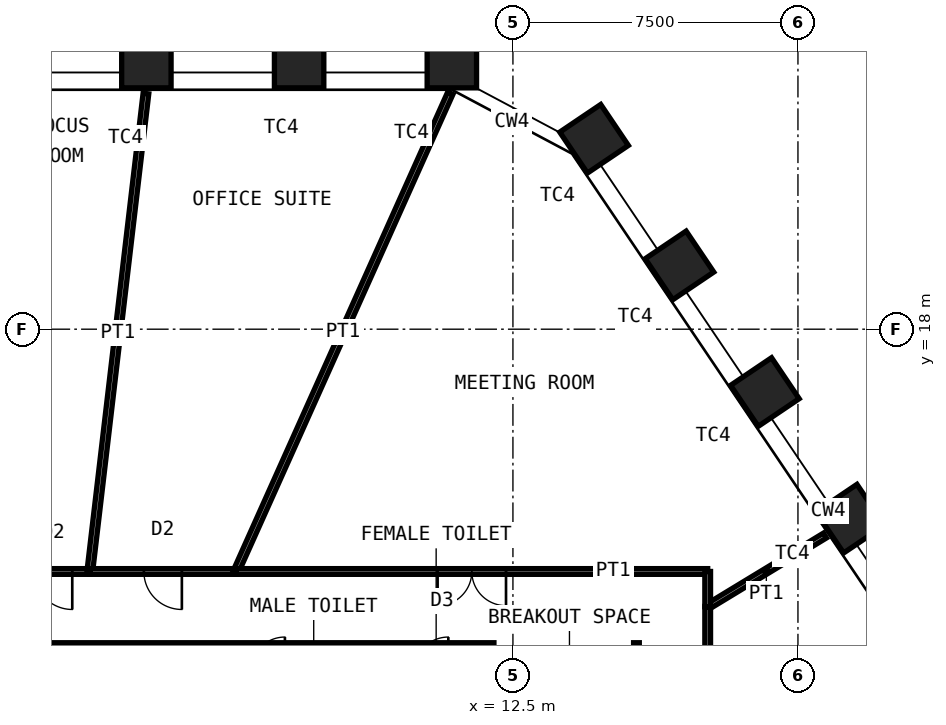
"""IFC4 building model, lengths in metres.
Left out: names, types, materials, properties, quantities, classifications, styles, units other than length and angle.
Written with IfcOpenShell. Run it as: python <this file> out.ifc"""

import sys

from ifc_helpers import new_model, si_unit, direction, frame, frame_2d, origin, origin_2d, place, context, subcontext, project, spatial, rectangle, hollow_rectangle, extrude, element, fill, save


model = new_model("IFC4")
c1 = context("Model", 3, precision=1e-05, world=origin(), true_north=direction((0.0, 1.0)))
c2 = subcontext(c1, "Body", "Model", "MODEL_VIEW")
j1 = project(units=[si_unit("LENGTHUNIT", "METRE"), si_unit("PLANEANGLEUNIT", "RADIAN")], contexts=[c1])
p1 = place(None, origin())
s1 = spatial("IfcSite", under=j1, at=p1, CompositionType="ELEMENT")
p2 = place(p1, origin())
s2 = spatial("IfcBuilding", under=s1, at=p2, CompositionType="ELEMENT")
p3 = place(p2, frame((0.0, 0.0, 145.0)))
s3 = spatial("IfcBuildingStorey", under=s2, at=p3, CompositionType="ELEMENT", Elevation=145.0)
for number, where, z_axis, x_axis in (
    (1, (2.854, 25.0, 0.0), (0.0, 0.0, 1.0), (-1.0, 0.0, 0.0)),
    (2, (6.874, 25.0, 0.0), (0.0, 0.0, 1.0), (-1.0, 0.0, 0.0)),
    (3, (10.893, 25.0, 0.0), (0.0, 0.0, 1.0), (-1.0, 0.0, 0.0)),
    (4, (14.635, 23.01, 0.0), (0.0, 0.0, 1.0), (-0.559, 0.829, 0.0)),
    (5, (16.882, 19.678, 0.0), (0.0, 0.0, 1.0), (-0.559, 0.829, 0.0)),
    (6, (19.13, 16.346, 0.0), (0.0, 0.0, 1.0), (-0.559, 0.829, 0.0)),
    (7, (21.377, 13.014, 0.0), (0.0, 0.0, 1.0), (-0.559, 0.829, 0.0)),
):
    element("IfcColumn", number, at=place(p3, frame(where, z_axis=z_axis, x_axis=x_axis)), inside=s3, PredefinedType="COLUMN", context=c2, shape_type="SweptSolid", body=[
        extrude(hollow_rectangle(XDim=1.3, YDim=1.3, WallThickness=0.1, at=origin_2d()), origin(), (0.0, 0.0, 1.0), 4.2),
    ])
p4 = place(p3, frame((-12.0, 9.0, 0.0), z_axis=(0.0, 0.0, 1.0), x_axis=(1.0, 0.0, 0.0)))
e8 = element("IfcWall", 8, at=p4, inside=s3, PredefinedType="SHEAR", context=c2, shape_type="SweptSolid", body=[
    extrude(rectangle(XDim=24.0, YDim=1.5, at=frame_2d((12.0, 0.0))), origin(), (0.0, 0.0, 1.0), 4.2),
])
p5 = place(p4, frame((10.4, 0.0, 0.0)))
e9 = element("IfcOpeningElement", 9, at=p5, cuts=e8, PredefinedType="OPENING", context=c2, shape_type="SweptSolid", body=[
    extrude(rectangle(XDim=1.0, YDim=2.1, at=frame_2d((0.5, 1.05))), frame((0.0, 0.76, 0.0), z_axis=(0.0, -1.0, 0.0), x_axis=(1.0, 0.0, 0.0)), (0.0, 0.0, 1.0), 1.52),
])
p6 = place(p4, frame((17.6, 0.0, 0.0)))
e10 = element("IfcOpeningElement", 10, at=p6, cuts=e8, PredefinedType="OPENING", context=c2, shape_type="SweptSolid", body=[
    extrude(rectangle(XDim=0.9, YDim=2.1, at=frame_2d((0.45, 1.05))), frame((0.0, 0.76, 0.0), z_axis=(0.0, -1.0, 0.0), x_axis=(1.0, 0.0, 0.0)), (0.0, 0.0, 1.0), 1.52),
])
p7 = place(p4, frame((21.9, 0.0, 0.0)))
e11 = element("IfcOpeningElement", 11, at=p7, cuts=e8, PredefinedType="OPENING", context=c2, shape_type="SweptSolid", body=[
    extrude(rectangle(XDim=0.9, YDim=2.1, at=frame_2d((0.45, 1.05))), frame((0.0, 0.76, 0.0), z_axis=(0.0, -1.0, 0.0), x_axis=(1.0, 0.0, 0.0)), (0.0, 0.0, 1.0), 1.52),
])
p8 = place(p3, frame((20.711, 12.571, 0.0), z_axis=(0.0, 0.0, 1.0), x_axis=(-0.854862500505, -0.518854608952, 0.0)))
e12 = element("IfcWall", 12, at=p8, inside=s3, PredefinedType="PARTITIONING", context=c2, shape_type="SweptSolid", body=[
    extrude(rectangle(XDim=3.61, YDim=0.15, at=frame_2d((1.805, 0.0))), origin(), (0.0, 0.0, 1.0), 3.33),
])
p9 = place(p3, frame((17.625, 10.698, 0.0), z_axis=(0.0, 0.0, 1.0), x_axis=(0.0, -1.0, 0.0)))
e13 = element("IfcWall", 13, at=p9, inside=s3, PredefinedType="PARTITIONING", context=c2, shape_type="SweptSolid", body=[
    extrude(rectangle(XDim=19.778, YDim=0.15, at=frame_2d((9.889, 0.0))), origin(), (0.0, 0.0, 1.0), 4.03),
])
p10 = place(p9, frame((8.989, 0.0, 0.0)))
e14 = element("IfcOpeningElement", 14, at=p10, cuts=e13, PredefinedType="OPENING", context=c2, shape_type="SweptSolid", body=[
    extrude(rectangle(XDim=1.8, YDim=2.4, at=frame_2d((0.9, 1.2))), frame((0.0, 0.085, 0.0), z_axis=(0.0, -1.0, 0.0), x_axis=(1.0, 0.0, 0.0)), (0.0, 0.0, 1.0), 0.17),
])
p11 = place(p3, frame((-0.557, 11.625, 0.0), z_axis=(0.0, 0.0, 1.0), x_axis=(1.0, 0.0, 0.0)))
e15 = element("IfcWall", 15, at=p11, inside=s3, PredefinedType="PARTITIONING", context=c2, shape_type="SweptSolid", body=[
    extrude(rectangle(XDim=1.923, YDim=0.15, at=frame_2d((0.961, 0.0))), origin(), (0.0, 0.0, 1.0), 4.03),
])
p12 = place(p11, frame((0.461, 0.0, 0.0)))
e16 = element("IfcOpeningElement", 16, at=p12, cuts=e15, PredefinedType="OPENING", context=c2, shape_type="SweptSolid", body=[
    extrude(rectangle(XDim=1.0, YDim=2.4, at=frame_2d((0.5, 1.2))), frame((0.0, 0.085, 0.0), z_axis=(0.0, -1.0, 0.0), x_axis=(1.0, 0.0, 0.0)), (0.0, 0.0, 1.0), 0.17),
])
p13 = place(p3, frame((2.843, 24.201, 0.0), z_axis=(0.0, 0.0, 1.0), x_axis=(-0.116670084723, -0.993170726175, 0.0)))
e17 = element("IfcWall", 17, at=p13, inside=s3, PredefinedType="PARTITIONING", context=c2, shape_type="SweptSolid", body=[
    extrude(rectangle(XDim=12.662, YDim=0.15, at=frame_2d((6.331, 0.0))), origin(), (0.0, 0.0, 1.0), 3.33),
])
p14 = place(p3, frame((1.366, 11.625, 0.0), z_axis=(0.0, 0.0, 1.0), x_axis=(1.0, 0.0, 0.0)))
e18 = element("IfcWall", 18, at=p14, inside=s3, PredefinedType="PARTITIONING", context=c2, shape_type="SweptSolid", body=[
    extrude(rectangle(XDim=3.845, YDim=0.15, at=frame_2d((1.923, 0.0))), origin(), (0.0, 0.0, 1.0), 4.03),
])
p15 = place(p14, frame((1.423, 0.0, 0.0)))
e19 = element("IfcOpeningElement", 19, at=p15, cuts=e18, PredefinedType="OPENING", context=c2, shape_type="SweptSolid", body=[
    extrude(rectangle(XDim=1.0, YDim=2.4, at=frame_2d((0.5, 1.2))), frame((0.0, 0.085, 0.0), z_axis=(0.0, -1.0, 0.0), x_axis=(1.0, 0.0, 0.0)), (0.0, 0.0, 1.0), 0.17),
])
p16 = place(p3, frame((10.852, 24.209, 0.0), z_axis=(0.0, 0.0, 1.0), x_axis=(-0.40904878746, -0.912512514696, 0.0)))
e20 = element("IfcWall", 20, at=p16, inside=s3, PredefinedType="PARTITIONING", context=c2, shape_type="SweptSolid", body=[
    extrude(rectangle(XDim=13.79, YDim=0.15, at=frame_2d((6.895, 0.0))), origin(), (0.0, 0.0, 1.0), 2.93),
])
p17 = place(p3, frame((5.211, 11.625, 0.0), z_axis=(0.0, 0.0, 1.0), x_axis=(1.0, 0.0, 0.0)))
e21 = element("IfcWall", 21, at=p17, inside=s3, PredefinedType="PARTITIONING", context=c2, shape_type="SweptSolid", body=[
    extrude(rectangle(XDim=12.414, YDim=0.15, at=frame_2d((6.207, 0.0))), origin(), (0.0, 0.0, 1.0), 4.03),
])
p18 = place(p17, frame((5.307, 0.0, 0.0)))
e22 = element("IfcOpeningElement", 22, at=p18, cuts=e21, PredefinedType="OPENING", context=c2, shape_type="SweptSolid", body=[
    extrude(rectangle(XDim=1.8, YDim=2.4, at=frame_2d((0.9, 1.2))), frame((0.0, 0.085, 0.0), z_axis=(0.0, -1.0, 0.0), x_axis=(1.0, 0.0, 0.0)), (0.0, 0.0, 1.0), 0.17),
])
p19 = place(p3, frame((17.625, 11.625, 0.0), z_axis=(0.0, 0.0, 1.0), x_axis=(0.0, -1.0, 0.0)))
e23 = element("IfcWall", 23, at=p19, inside=s3, PredefinedType="PARTITIONING", context=c2, shape_type="SweptSolid", body=[
    extrude(rectangle(XDim=0.927, YDim=0.15, at=frame_2d((0.464, 0.0))), origin(), (0.0, 0.0, 1.0), 4.03),
])
p20 = place(p3, frame((15.75, 1.9, 0.0), z_axis=(0.0, 0.0, 1.0), x_axis=(0.0, 1.0, 0.0)))
e24 = element("IfcWall", 24, at=p20, inside=s3, PredefinedType="PARTITIONING", context=c2, shape_type="SweptSolid", body=[
    extrude(rectangle(XDim=7.85, YDim=0.15, at=frame_2d((3.925, 0.0))), origin(), (0.0, 0.0, 1.0), 4.03),
])
p21 = place(p12, origin())
e25 = element("IfcDoor", 25, at=p21, inside=s3, OperationType="SINGLE_SWING_RIGHT", PredefinedType="DOOR", context=c2, shape_type="SweptSolid", body=[
    extrude(rectangle(XDim=1.0, YDim=2.4, at=frame_2d((0.5, 1.2))), frame((0.0, 0.025, 0.0), z_axis=(0.0, -1.0, 0.0), x_axis=(1.0, 0.0, 0.0)), (0.0, 0.0, 1.0), 0.05),
])
fill(e16, e25)
p22 = place(p15, origin())
e26 = element("IfcDoor", 26, at=p22, inside=s3, OperationType="SINGLE_SWING_RIGHT", PredefinedType="DOOR", context=c2, shape_type="SweptSolid", body=[
    extrude(rectangle(XDim=1.0, YDim=2.4, at=frame_2d((0.5, 1.2))), frame((0.0, 0.025, 0.0), z_axis=(0.0, -1.0, 0.0), x_axis=(1.0, 0.0, 0.0)), (0.0, 0.0, 1.0), 0.05),
])
fill(e19, e26)
p23 = place(p18, origin())
e27 = element("IfcDoor", 27, at=p23, inside=s3, OperationType="DOUBLE_DOOR_DOUBLE_SWING", PredefinedType="DOOR", context=c2, shape_type="SweptSolid", body=[
    extrude(rectangle(XDim=1.8, YDim=2.4, at=frame_2d((0.9, 1.2))), frame((0.0, 0.025, 0.0), z_axis=(0.0, -1.0, 0.0), x_axis=(1.0, 0.0, 0.0)), (0.0, 0.0, 1.0), 0.05),
])
fill(e22, e27)
save(model, sys.argv[1])
